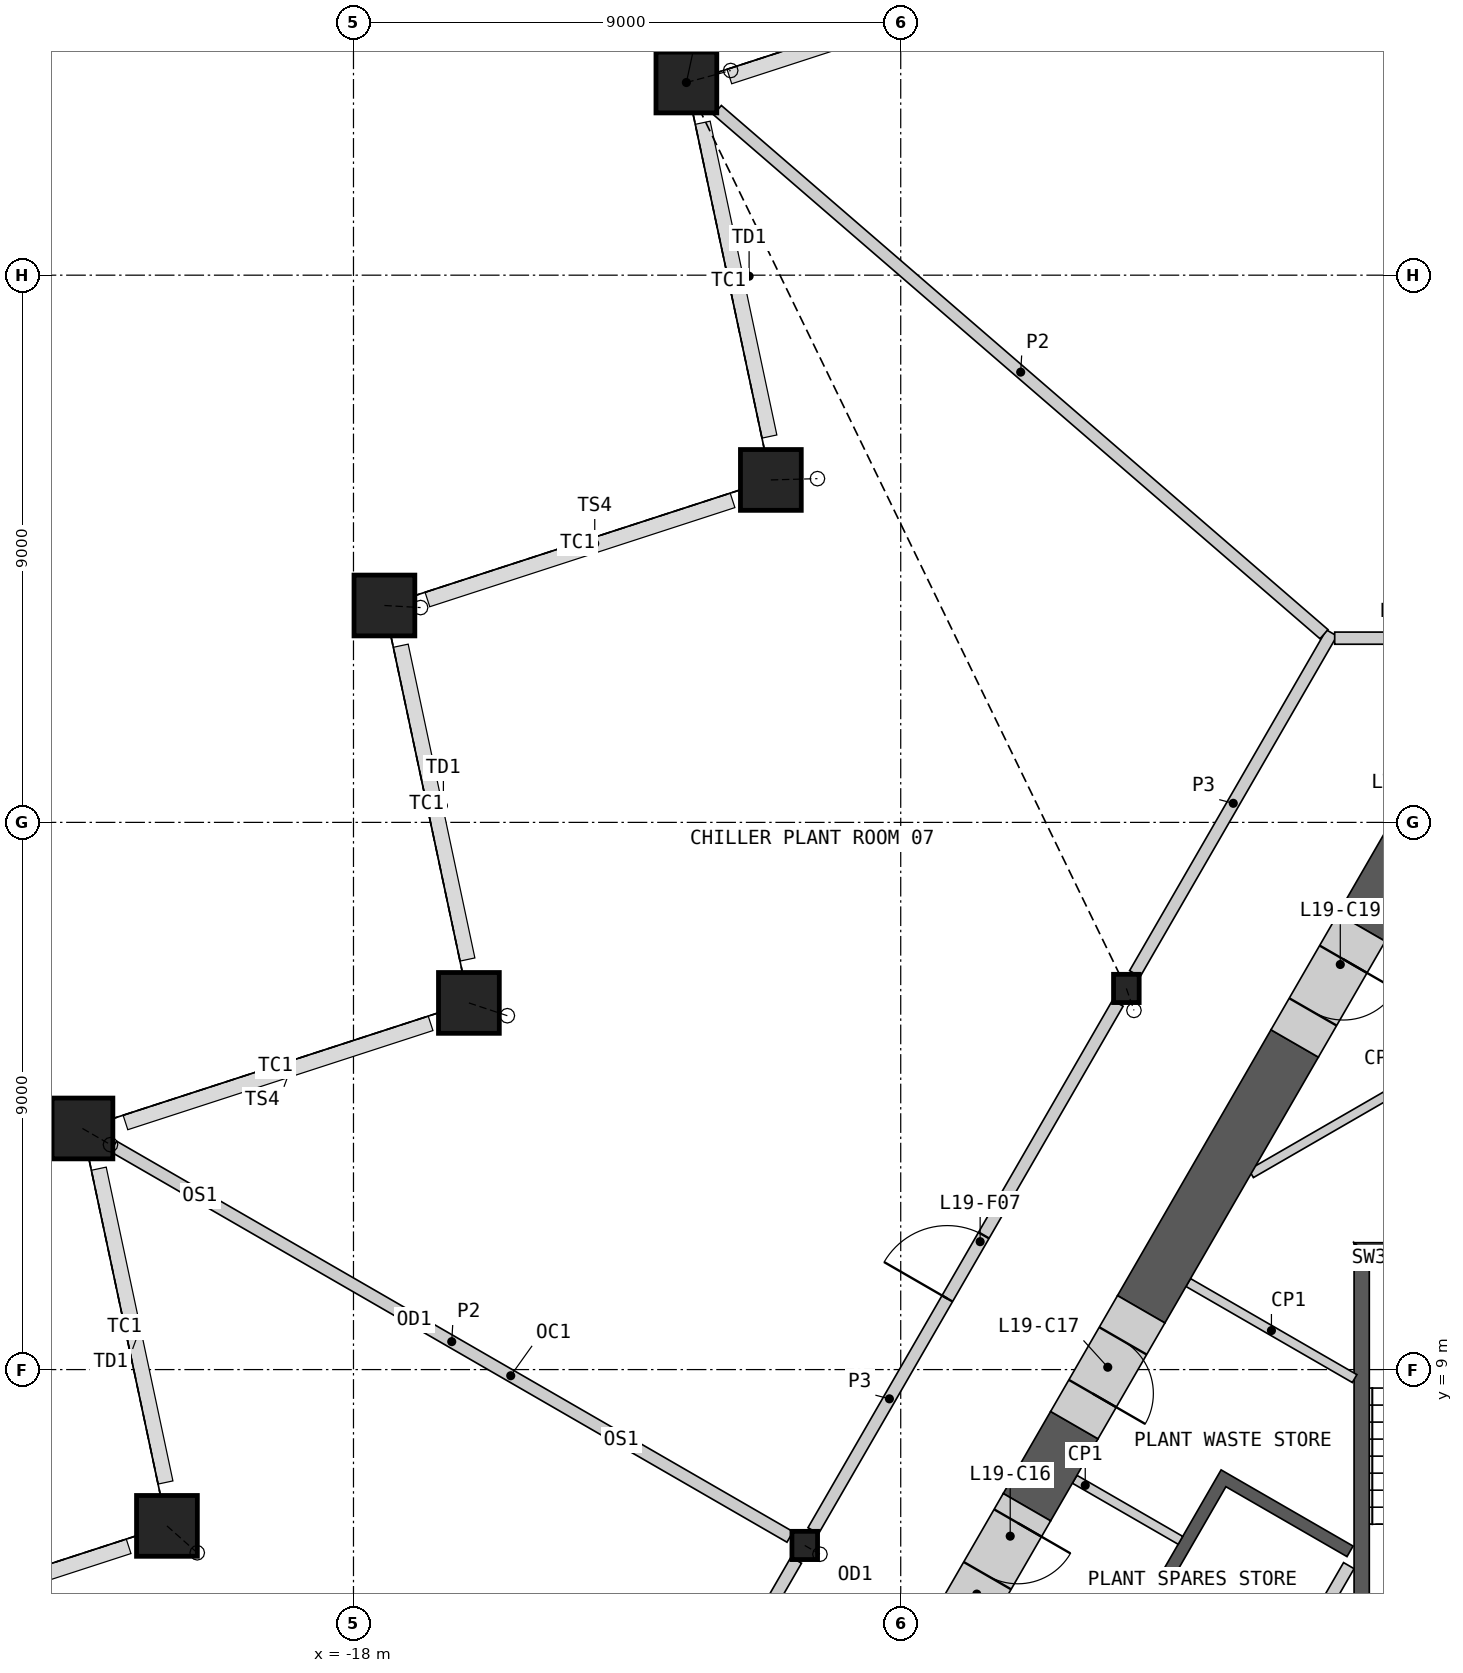
"""IFC4 building model, lengths in metres.
Left out: names, types, materials, properties, quantities, classifications, styles, units other than length and angle.
Written with IfcOpenShell. Run it as: python <this file> out.ifc"""

import sys

from ifc_helpers import new_model, si_unit, direction, frame, frame_2d, origin, origin_2d, place, context, subcontext, project, spatial, polyline, rectangle, hollow_rectangle, i_section, outline, extrude, element, fill, save


model = new_model("IFC4")
c1 = context("Model", 3, precision=1e-05, world=origin(), true_north=direction((0.0, 1.0)))
c2 = subcontext(c1, "Body", "Model", "MODEL_VIEW")
j1 = project(units=[si_unit("LENGTHUNIT", "METRE"), si_unit("PLANEANGLEUNIT", "RADIAN")], contexts=[c1])
p1 = place(None, origin())
s1 = spatial("IfcSite", under=j1, at=p1, CompositionType="ELEMENT")
p2 = place(p1, origin())
s2 = spatial("IfcBuilding", under=s1, at=p2, CompositionType="ELEMENT")
p3 = place(p2, frame((0.0, 0.0, 94.6)))
s3 = spatial("IfcBuildingStorey", under=s2, at=p3, CompositionType="ELEMENT", Elevation=94.6)
p4 = place(p3, frame((-12.525, 30.169, 0.0), z_axis=(0.144117980097, 0.039059110854, 0.988789357584), x_axis=(-0.261584923065, 0.965180463968, 0.0)))
e1 = element("IfcColumn", 1, at=p4, inside=s3, PredefinedType="COLUMN", context=c2, shape_type="SweptSolid", body=[
    extrude(hollow_rectangle(XDim=1.0, YDim=1.0, WallThickness=0.07, at=origin_2d()), frame((0.0, 0.0, 0.075)), (0.0, 0.0, 1.0), 4.906),
])
p5 = place(p3, frame((-11.136, 23.632, 0.0), z_axis=(0.151453734779, 0.004247268534, 0.988455222522), x_axis=(-0.02803231916, 0.999607017324, 0.0)))
e2 = element("IfcColumn", 2, at=p5, inside=s3, PredefinedType="COLUMN", context=c2, shape_type="SweptSolid", body=[
    extrude(hollow_rectangle(XDim=1.0, YDim=1.0, WallThickness=0.07, at=origin_2d()), frame((0.0, 0.0, 0.077)), (0.0, 0.0, 1.0), 4.905),
])
p6 = place(p3, frame((-17.491, 21.567, 0.0), z_axis=(0.118157805746, -0.006787892, 0.992971629738), x_axis=(0.057353120111, 0.998353955075, 0.0)))
e3 = element("IfcColumn", 3, at=p6, inside=s3, PredefinedType="COLUMN", context=c2, shape_type="SweptSolid", body=[
    extrude(hollow_rectangle(XDim=1.0, YDim=1.0, WallThickness=0.07, at=origin_2d()), frame((0.0, 0.0, 0.06)), (0.0, 0.0, 1.0), 4.916),
])
p7 = place(p3, frame((-16.102, 15.031, 0.0), z_axis=(0.125356273922, -0.041720891166, 0.991234165991), x_axis=(0.315788119833, 0.948829733605, 0.0)))
e4 = element("IfcColumn", 4, at=p7, inside=s3, PredefinedType="COLUMN", context=c2, shape_type="SweptSolid", body=[
    extrude(hollow_rectangle(XDim=1.0, YDim=1.0, WallThickness=0.07, at=origin_2d()), frame((0.0, 0.0, 0.067)), (0.0, 0.0, 1.0), 4.911),
])
p8 = place(p3, frame((-22.457, 12.966, 0.0), z_axis=(0.091669600312, -0.05292365696, 0.994382105085), x_axis=(0.499987164874, 0.866032814021, 0.0)))
e5 = element("IfcColumn", 5, at=p8, inside=s3, PredefinedType="COLUMN", context=c2, shape_type="SweptSolid", body=[
    extrude(hollow_rectangle(XDim=1.0, YDim=1.0, WallThickness=0.07, at=origin_2d()), frame((0.0, 0.0, 0.053)), (0.0, 0.0, 1.0), 4.922),
])
p9 = place(p3, frame((-21.068, 6.429, 0.0), z_axis=(0.098784861039, -0.08770120931, 0.991236626197), x_axis=(0.663908879859, 0.747813478914, 0.0)))
e6 = element("IfcColumn", 6, at=p9, inside=s3, PredefinedType="COLUMN", context=c2, shape_type="SweptSolid", body=[
    extrude(hollow_rectangle(XDim=1.0, YDim=1.0, WallThickness=0.07, at=origin_2d()), frame((0.0, 0.0, 0.067)), (0.0, 0.0, 1.0), 4.911),
])
p10 = place(p3, frame((-5.289, 15.269, 0.0), z_axis=(0.024927402258, -0.071958399488, 0.997096090334), x_axis=(0.944910039342, 0.327330135415, 0.0)))
e7 = element("IfcColumn", 7, at=p10, inside=s3, PredefinedType="COLUMN", context=c2, shape_type="SweptSolid", body=[
    extrude(i_section(OverallWidth=0.421, OverallDepth=0.465, WebThickness=0.045, FlangeThickness=0.072, at=origin_2d()), frame((0.0, 0.0, 0.018)), (0.0, 0.0, 1.0), 4.979),
])
p11 = place(p3, frame((-10.578, 6.107, 0.0), z_axis=(0.049916888914, -0.028809454442, 0.998337778277), x_axis=(0.499868889286, 0.866101087359, 0.0)))
e8 = element("IfcColumn", 8, at=p11, inside=s3, PredefinedType="COLUMN", context=c2, shape_type="SweptSolid", body=[
    extrude(i_section(OverallWidth=0.421, OverallDepth=0.465, WebThickness=0.045, FlangeThickness=0.072, at=origin_2d()), frame((0.0, 0.0, 0.013)), (0.0, 0.0, 1.0), 4.981),
])
p12 = place(p3, origin())
e9 = element("IfcWall", 9, at=p12, inside=s3, PredefinedType="SHEAR", context=c2, shape_type="SweptSolid", body=[
    extrude(outline(polyline([(-4.96, 0.208), (-7.131, 1.461), (-3.731, 7.35), (-1.561, 6.097), (-1.66, 5.924), (-3.652, 7.074), (-5.752, 3.437), (-3.76, 2.287), (-3.861, 2.113), (-5.852, 3.263), (-6.852, 1.531), (-4.861, 0.381), (-4.96, 0.208)])), origin(), (0.0, 0.0, 1.0), 4.6),
])
p13 = place(p3, frame((-1.631, 5.776, 0.0), z_axis=(0.0, 0.0, 1.0), x_axis=(-0.499992876559, -0.866029516466, 0.0)))
e10 = element("IfcWall", 10, at=p13, inside=s3, PredefinedType="SOLIDWALL", context=c2, shape_type="SweptSolid", body=[
    extrude(rectangle(XDim=6.486, YDim=0.2, at=frame_2d((3.243, 0.0))), origin(), (0.0, 0.0, 1.0), 4.6),
])
p14 = place(p13, frame((1.537, 0.0, 0.0)))
e11 = element("IfcOpeningElement", 11, at=p14, cuts=e10, PredefinedType="OPENING", context=c2, shape_type="SweptSolid", body=[
    extrude(rectangle(XDim=0.9, YDim=2.1, at=frame_2d((0.45, 1.05))), frame((0.0, 0.11, 0.0), z_axis=(0.0, -1.0, 0.0), x_axis=(1.0, 0.0, 0.0)), (0.0, 0.0, 1.0), 0.22),
])
p15 = place(p3, origin())
e12 = element("IfcWall", 12, at=p15, inside=s3, PredefinedType="SHEAR", context=c2, shape_type="SweptSolid", body=[
    extrude(outline(polyline([(1.544, 11.087), (-1.544, 11.087), (-1.294, 10.837), (1.294, 10.837), (1.544, 11.087)])), origin(), (0.0, 0.0, 1.0), 4.6),
])
p16 = place(p3, origin())
e13 = element("IfcWall", 13, at=p16, inside=s3, PredefinedType="SHEAR", context=c2, shape_type="SweptSolid", body=[
    extrude(outline(polyline([(-1.294, 10.837), (-1.544, 11.087), (-1.544, 5.237), (-1.294, 5.237), (-1.294, 10.837)])), origin(), (0.0, 0.0, 1.0), 4.6),
])
p17 = place(p3, frame((-6.139, 7.196, 0.0), z_axis=(0.0, 0.0, 1.0), x_axis=(0.866035824272, -0.499981950752, 0.0)))
e14 = element("IfcWall", 14, at=p17, inside=s3, PredefinedType="PARTITIONING", context=c2, shape_type="SweptSolid", body=[
    extrude(rectangle(XDim=2.009, YDim=0.15, at=frame_2d((1.004, 0.0))), origin(), (0.0, 0.0, 1.0), 4.6),
])
p18 = place(p3, frame((-4.271, 10.432, 0.0), z_axis=(0.0, 0.0, 1.0), x_axis=(0.866018279777, -0.50001233894, 0.0)))
e15 = element("IfcWall", 15, at=p18, inside=s3, PredefinedType="PARTITIONING", context=c2, shape_type="SweptSolid", body=[
    extrude(rectangle(XDim=3.159, YDim=0.15, at=frame_2d((1.58, 0.0))), origin(), (0.0, 0.0, 1.0), 4.6),
])
p19 = place(p3, frame((1.619, 15.026, 0.0), z_axis=(0.0, 0.0, 1.0), x_axis=(-0.866015917575, -0.500016430238, 0.0)))
e16 = element("IfcWall", 16, at=p19, inside=s3, PredefinedType="PARTITIONING", context=c2, shape_type="SweptSolid", body=[
    extrude(rectangle(XDim=5.607, YDim=0.15, at=frame_2d((2.804, 0.0))), origin(), (0.0, 0.0, 1.0), 4.6),
])
p20 = place(p3, frame((-2.521, 14.364, 0.0), z_axis=(0.0, 0.0, 1.0), x_axis=(-0.500014099723, -0.866017263153, 0.0)))
e17 = element("IfcWall", 17, at=p20, inside=s3, PredefinedType="SHEAR", context=c2, shape_type="SweptSolid", body=[
    extrude(rectangle(XDim=5.048, YDim=0.9, at=frame_2d((2.524, 0.0))), origin(), (0.0, 0.0, 1.0), 4.6),
])
p21 = place(p3, frame((-0.39, 18.055, 0.0), z_axis=(0.0, 0.0, 1.0), x_axis=(-0.500009360108, -0.866019999656, 0.0)))
e18 = element("IfcWall", 18, at=p21, inside=s3, PredefinedType="SHEAR", context=c2, shape_type="SweptSolid", body=[
    extrude(rectangle(XDim=2.062, YDim=0.9, at=frame_2d((1.031, 0.0))), origin(), (0.0, 0.0, 1.0), 4.6),
])
p22 = place(p3, frame((-6.145, 8.086, 0.0), z_axis=(0.0, 0.0, 1.0), x_axis=(-0.500047902311, -0.865997745606, 0.0)))
e19 = element("IfcWall", 19, at=p22, inside=s3, PredefinedType="SHEAR", context=c2, shape_type="SweptSolid", body=[
    extrude(rectangle(XDim=1.558, YDim=0.9, at=frame_2d((0.779, 0.0))), origin(), (0.0, 0.0, 1.0), 4.6),
])
p23 = place(p3, frame((-6.924, 6.737, 0.0), z_axis=(0.0, 0.0, 1.0), x_axis=(-0.50002983664, -0.866008176907, 0.0)))
e20 = element("IfcWall", 20, at=p23, inside=s3, PredefinedType="SHEAR", context=c2, shape_type="SweptSolid", body=[
    extrude(rectangle(XDim=2.2, YDim=0.9, at=frame_2d((1.1, 0.0))), origin(), (0.0, 0.0, 1.0), 4.6),
])
p24 = place(p23, frame((0.3, 0.0, 0.0)))
e21 = element("IfcOpeningElement", 21, at=p24, cuts=e20, PredefinedType="OPENING", context=c2, shape_type="SweptSolid", body=[
    extrude(rectangle(XDim=1.0, YDim=2.1, at=frame_2d((0.5, 1.05))), frame((0.0, 0.46, 0.0), z_axis=(0.0, -1.0, 0.0), x_axis=(1.0, 0.0, 0.0)), (0.0, 0.0, 1.0), 0.92),
])
p25 = place(p3, frame((-5.045, 9.992, 0.0), z_axis=(0.0, 0.0, 1.0), x_axis=(-0.499898558967, -0.866083962871, 0.0)))
e22 = element("IfcWall", 22, at=p25, inside=s3, PredefinedType="SHEAR", context=c2, shape_type="SweptSolid", body=[
    extrude(rectangle(XDim=2.2, YDim=0.9, at=frame_2d((1.1, 0.0))), origin(), (0.0, 0.0, 1.0), 4.6),
])
p26 = place(p25, frame((0.6, 0.0, 0.0)))
e23 = element("IfcOpeningElement", 23, at=p26, cuts=e22, PredefinedType="OPENING", context=c2, shape_type="SweptSolid", body=[
    extrude(rectangle(XDim=1.0, YDim=2.1, at=frame_2d((0.5, 1.05))), frame((0.0, 0.46, 0.0), z_axis=(0.0, -1.0, 0.0), x_axis=(1.0, 0.0, 0.0)), (0.0, 0.0, 1.0), 0.92),
])
p27 = place(p3, frame((-1.421, 16.269, 0.0), z_axis=(0.0, 0.0, 1.0), x_axis=(-0.50002983664, -0.866008176907, 0.0)))
e24 = element("IfcWall", 24, at=p27, inside=s3, PredefinedType="SHEAR", context=c2, shape_type="SweptSolid", body=[
    extrude(rectangle(XDim=2.2, YDim=0.9, at=frame_2d((1.1, 0.0))), origin(), (0.0, 0.0, 1.0), 4.6),
])
p28 = place(p27, frame((0.6, 0.0, 0.0)))
e25 = element("IfcOpeningElement", 25, at=p28, cuts=e24, PredefinedType="OPENING", context=c2, shape_type="SweptSolid", body=[
    extrude(rectangle(XDim=1.0, YDim=2.1, at=frame_2d((0.5, 1.05))), frame((0.0, 0.46, 0.0), z_axis=(0.0, -1.0, 0.0), x_axis=(1.0, 0.0, 0.0)), (0.0, 0.0, 1.0), 0.92),
])
p29 = place(p3, frame((-10.439, 6.35, 0.0), z_axis=(0.0, 0.0, 1.0), x_axis=(0.50001002959, 0.86601961312, 0.0)))
e26 = element("IfcWall", 26, at=p29, inside=s3, PredefinedType="PARTITIONING", context=c2, shape_type="SweptSolid", body=[
    extrude(rectangle(XDim=10.019, YDim=0.2, at=frame_2d((5.009, 0.0))), origin(), (0.0, 0.0, 1.0), 4.6),
])
p30 = place(p29, frame((4.409, 0.0, 0.0)))
e27 = element("IfcOpeningElement", 27, at=p30, cuts=e26, PredefinedType="OPENING", context=c2, shape_type="SweptSolid", body=[
    extrude(rectangle(XDim=1.2, YDim=2.1, at=frame_2d((0.6, 1.05))), frame((0.0, 0.11, 0.0), z_axis=(0.0, -1.0, 0.0), x_axis=(1.0, 0.0, 0.0)), (0.0, 0.0, 1.0), 0.22),
])
p31 = place(p3, frame((-15.728, -2.811, 0.0), z_axis=(0.0, 0.0, 1.0), x_axis=(0.49999175339, 0.866030164915, 0.0)))
e28 = element("IfcWall", 28, at=p31, inside=s3, PredefinedType="PARTITIONING", context=c2, shape_type="SweptSolid", body=[
    extrude(rectangle(XDim=10.019, YDim=0.2, at=frame_2d((5.009, 0.0))), origin(), (0.0, 0.0, 1.0), 4.6),
])
p32 = place(p31, frame((4.409, 0.0, 0.0)))
e29 = element("IfcOpeningElement", 29, at=p32, cuts=e28, PredefinedType="OPENING", context=c2, shape_type="SweptSolid", body=[
    extrude(rectangle(XDim=1.2, YDim=2.1, at=frame_2d((0.6, 1.05))), frame((0.0, 0.11, 0.0), z_axis=(0.0, -1.0, 0.0), x_axis=(1.0, 0.0, 0.0)), (0.0, 0.0, 1.0), 0.22),
])
p33 = place(p3, frame((-5.149, 15.511, 0.0), z_axis=(0.0, 0.0, 1.0), x_axis=(0.500001069878, 0.866024786089, 0.0)))
e30 = element("IfcWall", 30, at=p33, inside=s3, PredefinedType="PARTITIONING", context=c2, shape_type="SweptSolid", body=[
    extrude(rectangle(XDim=6.473, YDim=0.2, at=frame_2d((3.236, 0.0))), origin(), (0.0, 0.0, 1.0), 4.6),
])
p34 = place(p3, frame((-1.863, 21.03, 0.0), z_axis=(0.0, 0.0, 1.0), x_axis=(1.0, 0.0, 0.0)))
e31 = element("IfcWall", 31, at=p34, inside=s3, PredefinedType="PARTITIONING", context=c2, shape_type="SweptSolid", body=[
    extrude(rectangle(XDim=3.726, YDim=0.2, at=frame_2d((1.863, 0.0))), origin(), (0.0, 0.0, 1.0), 4.6),
])
p35 = place(p34, frame((2.325, 0.0, 0.0)))
e32 = element("IfcOpeningElement", 32, at=p35, cuts=e31, PredefinedType="OPENING", context=c2, shape_type="SweptSolid", body=[
    extrude(rectangle(XDim=1.2, YDim=2.1, at=frame_2d((0.6, 1.05))), frame((0.0, 0.11, 0.0), z_axis=(0.0, -1.0, 0.0), x_axis=(1.0, 0.0, 0.0)), (0.0, 0.0, 1.0), 0.22),
])
p36 = place(p3, frame((-12.015, 29.716, 0.0), z_axis=(0.0, 0.0, 1.0), x_axis=(0.756656024203, -0.653813169826, 0.0)))
e33 = element("IfcWall", 33, at=p36, inside=s3, PredefinedType="PARTITIONING", context=c2, shape_type="SweptSolid", body=[
    extrude(rectangle(XDim=13.185, YDim=0.2, at=frame_2d((6.592, 0.0))), origin(), (0.0, 0.0, 1.0), 4.6),
])
p37 = place(p3, frame((-21.947, 12.671, 0.0), z_axis=(0.0, 0.0, 1.0), x_axis=(0.866026729935, -0.499997703033, 0.0)))
e34 = element("IfcWall", 34, at=p37, inside=s3, PredefinedType="PARTITIONING", context=c2, shape_type="SweptSolid", body=[
    extrude(rectangle(XDim=12.848, YDim=0.2, at=frame_2d((6.424, 0.0))), origin(), (0.0, 0.0, 1.0), 4.6),
])
p38 = place(p24, origin())
e35 = element("IfcDoor", 35, at=p38, inside=s3, OperationType="SINGLE_SWING_LEFT", PredefinedType="DOOR", context=c2, shape_type="SweptSolid", body=[
    extrude(rectangle(XDim=1.0, YDim=2.1, at=frame_2d((0.5, 1.05))), frame((0.0, 0.205, 0.0), z_axis=(0.0, -1.0, 0.0), x_axis=(1.0, 0.0, 0.0)), (0.0, 0.0, 1.0), 0.05),
])
fill(e21, e35)
p39 = place(p26, origin())
e36 = element("IfcDoor", 36, at=p39, inside=s3, OperationType="SINGLE_SWING_RIGHT", PredefinedType="DOOR", context=c2, shape_type="SweptSolid", body=[
    extrude(rectangle(XDim=1.0, YDim=2.1, at=frame_2d((0.5, 1.05))), frame((0.0, 0.205, 0.0), z_axis=(0.0, -1.0, 0.0), x_axis=(1.0, 0.0, 0.0)), (0.0, 0.0, 1.0), 0.05),
])
fill(e23, e36)
p40 = place(p28, origin())
e37 = element("IfcDoor", 37, at=p40, inside=s3, OperationType="SINGLE_SWING_LEFT", PredefinedType="DOOR", context=c2, shape_type="SweptSolid", body=[
    extrude(rectangle(XDim=1.0, YDim=2.1, at=frame_2d((0.5, 1.05))), frame((0.0, 0.205, 0.0), z_axis=(0.0, -1.0, 0.0), x_axis=(1.0, 0.0, 0.0)), (0.0, 0.0, 1.0), 0.05),
])
fill(e25, e37)
p41 = place(p30, origin())
e38 = element("IfcDoor", 38, at=p41, inside=s3, OperationType="SINGLE_SWING_LEFT", PredefinedType="DOOR", context=c2, shape_type="SweptSolid", body=[
    extrude(rectangle(XDim=1.2, YDim=2.1, at=frame_2d((0.6, 1.05))), frame((0.0, 0.025, 0.0), z_axis=(0.0, -1.0, 0.0), x_axis=(1.0, 0.0, 0.0)), (0.0, 0.0, 1.0), 0.05),
])
fill(e27, e38)
save(model, sys.argv[1])
